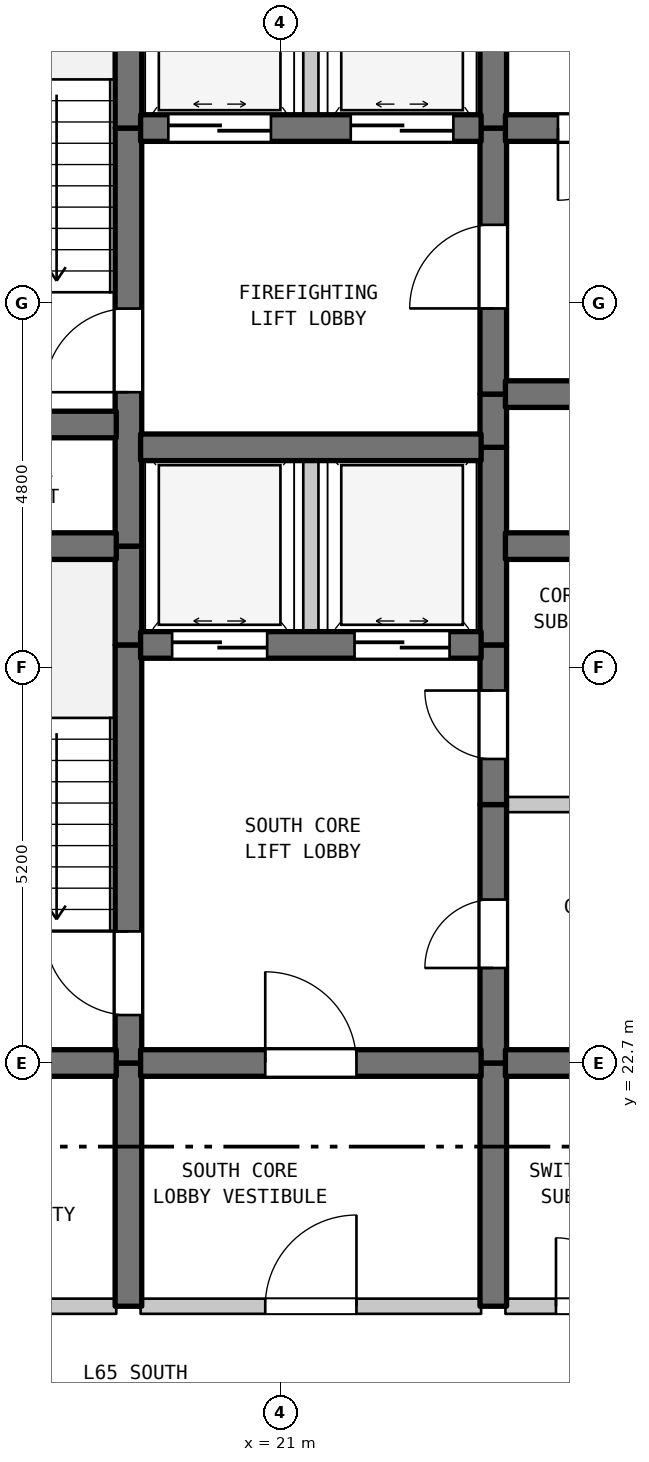
"""IFC4 building model, lengths in metres.
Left out: names, types, materials, properties, quantities, classifications, styles, units other than length and angle.
Written with IfcOpenShell. Run it as: python <this file> out.ifc"""

import sys

from ifc_helpers import new_model, si_unit, direction, frame, frame_2d, origin, place, context, subcontext, project, spatial, rectangle, extrude, element, fill, save


model = new_model("IFC4")
c1 = context("Model", 3, precision=1e-05, world=origin(), true_north=direction((0.0, 1.0)))
c2 = subcontext(c1, "Body", "Model", "MODEL_VIEW")
j1 = project(units=[si_unit("LENGTHUNIT", "METRE"), si_unit("PLANEANGLEUNIT", "RADIAN")], contexts=[c1])
p1 = place(None, origin())
s1 = spatial("IfcSite", under=j1, at=p1, CompositionType="ELEMENT")
p2 = place(p1, origin())
s2 = spatial("IfcBuilding", under=s1, at=p2, CompositionType="ELEMENT")
p3 = place(p2, frame((0.0, 0.0, 262.1)))
s3 = spatial("IfcBuildingStorey", under=s2, at=p3, CompositionType="ELEMENT", Elevation=262.1)
p4 = place(p3, frame((19.0, 19.5, 0.0), z_axis=(0.0, 0.0, 1.0), x_axis=(0.0, 1.0, 0.0)))
e1 = element("IfcWall", 1, at=p4, inside=s3, PredefinedType="SHEAR", context=c2, shape_type="SweptSolid", body=[
    extrude(rectangle(XDim=3.2, YDim=0.35, at=frame_2d((1.6, 0.0))), origin(), (0.0, 0.0, 1.0), 3.39),
])
p5 = place(p3, frame((19.0, 22.7, 0.0), z_axis=(0.0, 0.0, 1.0), x_axis=(0.0, 1.0, 0.0)))
e2 = element("IfcWall", 2, at=p5, inside=s3, PredefinedType="SHEAR", context=c2, shape_type="SweptSolid", body=[
    extrude(rectangle(XDim=5.5, YDim=0.35, at=frame_2d((2.75, 0.0))), origin(), (0.0, 0.0, 1.0), 3.39),
])
p6 = place(p5, frame((0.631, 0.0, 0.0)))
e3 = element("IfcOpeningElement", 3, at=p6, cuts=e2, PredefinedType="OPENING", context=c2, shape_type="SweptSolid", body=[
    extrude(rectangle(XDim=1.1, YDim=2.15, at=frame_2d((0.55, 1.075))), frame((0.0, 0.185, 0.0), z_axis=(0.0, -1.0, 0.0), x_axis=(1.0, 0.0, 0.0)), (0.0, 0.0, 1.0), 0.37),
])
p7 = place(p3, frame((19.0, 28.2, 0.0), z_axis=(0.0, 0.0, 1.0), x_axis=(0.0, 1.0, 0.0)))
e4 = element("IfcWall", 4, at=p7, inside=s3, PredefinedType="SHEAR", context=c2, shape_type="SweptSolid", body=[
    extrude(rectangle(XDim=1.3, YDim=0.35, at=frame_2d((0.65, 0.0))), origin(), (0.0, 0.0, 1.0), 3.39),
])
p8 = place(p3, frame((19.0, 29.5, 0.0), z_axis=(0.0, 0.0, 1.0), x_axis=(0.0, 1.0, 0.0)))
e5 = element("IfcWall", 5, at=p8, inside=s3, PredefinedType="SHEAR", context=c2, shape_type="SweptSolid", body=[
    extrude(rectangle(XDim=5.5, YDim=0.35, at=frame_2d((2.75, 0.0))), origin(), (0.0, 0.0, 1.0), 3.39),
])
p9 = place(p8, frame((2.025, 0.0, 0.0)))
e6 = element("IfcOpeningElement", 6, at=p9, cuts=e5, PredefinedType="OPENING", context=c2, shape_type="SweptSolid", body=[
    extrude(rectangle(XDim=1.1, YDim=2.15, at=frame_2d((0.55, 1.075))), frame((0.0, 0.185, 0.0), z_axis=(0.0, -1.0, 0.0), x_axis=(1.0, 0.0, 0.0)), (0.0, 0.0, 1.0), 0.37),
])
p10 = place(p3, frame((19.0, 35.0, 0.0), z_axis=(0.0, 0.0, 1.0), x_axis=(0.0, 1.0, 0.0)))
e7 = element("IfcWall", 7, at=p10, inside=s3, PredefinedType="SHEAR", context=c2, shape_type="SweptSolid", body=[
    extrude(rectangle(XDim=2.9, YDim=0.35, at=frame_2d((1.45, 0.0))), origin(), (0.0, 0.0, 1.0), 3.39),
])
p11 = place(p3, frame((21.4, 28.2, 0.0), z_axis=(0.0, 0.0, 1.0), x_axis=(0.0, 1.0, 0.0)))
e8 = element("IfcWall", 8, at=p11, inside=s3, PredefinedType="STANDARD", context=c2, shape_type="SweptSolid", body=[
    extrude(rectangle(XDim=2.6, YDim=0.2, at=frame_2d((1.3, 0.0))), origin(), (0.0, 0.0, 1.0), 3.39),
])
p12 = place(p3, frame((21.4, 35.0, 0.0), z_axis=(0.0, 0.0, 1.0), x_axis=(0.0, 1.0, 0.0)))
e9 = element("IfcWall", 9, at=p12, inside=s3, PredefinedType="STANDARD", context=c2, shape_type="SweptSolid", body=[
    extrude(rectangle(XDim=2.9, YDim=0.2, at=frame_2d((1.45, 0.0))), origin(), (0.0, 0.0, 1.0), 3.39),
])
p13 = place(p3, frame((23.8, 19.5, 0.0), z_axis=(0.0, 0.0, 1.0), x_axis=(0.0, 1.0, 0.0)))
e10 = element("IfcWall", 10, at=p13, inside=s3, PredefinedType="SHEAR", context=c2, shape_type="SweptSolid", body=[
    extrude(rectangle(XDim=3.2, YDim=0.35, at=frame_2d((1.6, 0.0))), origin(), (0.0, 0.0, 1.0), 3.39),
])
p14 = place(p3, frame((23.8, 22.7, 0.0), z_axis=(0.0, 0.0, 1.0), x_axis=(0.0, 1.0, 0.0)))
e11 = element("IfcWall", 11, at=p14, inside=s3, PredefinedType="SHEAR", context=c2, shape_type="SweptSolid", body=[
    extrude(rectangle(XDim=3.4, YDim=0.35, at=frame_2d((1.7, 0.0))), origin(), (0.0, 0.0, 1.0), 3.39),
])
p15 = place(p14, frame((1.25, 0.0, 0.0)))
e12 = element("IfcOpeningElement", 12, at=p15, cuts=e11, PredefinedType="OPENING", context=c2, shape_type="SweptSolid", body=[
    extrude(rectangle(XDim=0.9, YDim=2.15, at=frame_2d((0.45, 1.075))), frame((0.0, 0.185, 0.0), z_axis=(0.0, -1.0, 0.0), x_axis=(1.0, 0.0, 0.0)), (0.0, 0.0, 1.0), 0.37),
])
p16 = place(p3, frame((23.8, 26.1, 0.0), z_axis=(0.0, 0.0, 1.0), x_axis=(0.0, 1.0, 0.0)))
e13 = element("IfcWall", 13, at=p16, inside=s3, PredefinedType="SHEAR", context=c2, shape_type="SweptSolid", body=[
    extrude(rectangle(XDim=2.1, YDim=0.35, at=frame_2d((1.05, 0.0))), origin(), (0.0, 0.0, 1.0), 3.39),
])
p17 = place(p16, frame((0.6, 0.0, 0.0)))
e14 = element("IfcOpeningElement", 14, at=p17, cuts=e13, PredefinedType="OPENING", context=c2, shape_type="SweptSolid", body=[
    extrude(rectangle(XDim=0.9, YDim=2.15, at=frame_2d((0.45, 1.075))), frame((0.0, 0.185, 0.0), z_axis=(0.0, -1.0, 0.0), x_axis=(1.0, 0.0, 0.0)), (0.0, 0.0, 1.0), 0.37),
])
p18 = place(p3, frame((23.8, 28.2, 0.0), z_axis=(0.0, 0.0, 1.0), x_axis=(0.0, 1.0, 0.0)))
e15 = element("IfcWall", 15, at=p18, inside=s3, PredefinedType="SHEAR", context=c2, shape_type="SweptSolid", body=[
    extrude(rectangle(XDim=2.6, YDim=0.35, at=frame_2d((1.3, 0.0))), origin(), (0.0, 0.0, 1.0), 3.39),
])
p19 = place(p3, frame((23.8, 30.8, 0.0), z_axis=(0.0, 0.0, 1.0), x_axis=(0.0, 1.0, 0.0)))
e16 = element("IfcWall", 16, at=p19, inside=s3, PredefinedType="SHEAR", context=c2, shape_type="SweptSolid", body=[
    extrude(rectangle(XDim=0.7, YDim=0.35, at=frame_2d((0.35, 0.0))), origin(), (0.0, 0.0, 1.0), 3.39),
])
p20 = place(p3, frame((23.8, 31.5, 0.0), z_axis=(0.0, 0.0, 1.0), x_axis=(0.0, 1.0, 0.0)))
e17 = element("IfcWall", 17, at=p20, inside=s3, PredefinedType="SHEAR", context=c2, shape_type="SweptSolid", body=[
    extrude(rectangle(XDim=3.5, YDim=0.35, at=frame_2d((1.75, 0.0))), origin(), (0.0, 0.0, 1.0), 3.39),
])
p21 = place(p20, frame((1.127, 0.0, 0.0)))
e18 = element("IfcOpeningElement", 18, at=p21, cuts=e17, PredefinedType="OPENING", context=c2, shape_type="SweptSolid", body=[
    extrude(rectangle(XDim=1.1, YDim=2.15, at=frame_2d((0.55, 1.075))), frame((0.0, 0.185, 0.0), z_axis=(0.0, -1.0, 0.0), x_axis=(1.0, 0.0, 0.0)), (0.0, 0.0, 1.0), 0.37),
])
p22 = place(p3, frame((23.8, 35.0, 0.0), z_axis=(0.0, 0.0, 1.0), x_axis=(0.0, 1.0, 0.0)))
e19 = element("IfcWall", 19, at=p22, inside=s3, PredefinedType="SHEAR", context=c2, shape_type="SweptSolid", body=[
    extrude(rectangle(XDim=2.9, YDim=0.35, at=frame_2d((1.45, 0.0))), origin(), (0.0, 0.0, 1.0), 3.39),
])
p23 = place(p3, frame((15.16, 19.5, 0.0), z_axis=(0.0, 0.0, 1.0), x_axis=(1.0, 0.0, 0.0)))
e20 = element("IfcWall", 20, at=p23, inside=s3, PredefinedType="STANDARD", context=c2, shape_type="SweptSolid", body=[
    extrude(rectangle(XDim=3.68, YDim=0.2, at=frame_2d((1.84, 0.0))), origin(), (0.0, 0.0, 1.0), 3.39),
])
p24 = place(p23, frame((1.39, 0.0, 0.0)))
e21 = element("IfcOpeningElement", 21, at=p24, cuts=e20, PredefinedType="OPENING", context=c2, shape_type="SweptSolid", body=[
    extrude(rectangle(XDim=0.9, YDim=2.15, at=frame_2d((0.45, 1.075))), frame((0.0, 0.11, 0.0), z_axis=(0.0, -1.0, 0.0), x_axis=(1.0, 0.0, 0.0)), (0.0, 0.0, 1.0), 0.22),
])
p25 = place(p3, frame((19.16, 19.5, 0.0), z_axis=(0.0, 0.0, 1.0), x_axis=(1.0, 0.0, 0.0)))
e22 = element("IfcWall", 22, at=p25, inside=s3, PredefinedType="STANDARD", context=c2, shape_type="SweptSolid", body=[
    extrude(rectangle(XDim=4.48, YDim=0.2, at=frame_2d((2.24, 0.0))), origin(), (0.0, 0.0, 1.0), 3.39),
])
p26 = place(p25, frame((1.64, 0.0, 0.0)))
e23 = element("IfcOpeningElement", 23, at=p26, cuts=e22, PredefinedType="OPENING", context=c2, shape_type="SweptSolid", body=[
    extrude(rectangle(XDim=1.2, YDim=2.2, at=frame_2d((0.6, 1.1))), frame((0.0, 0.11, 0.0), z_axis=(0.0, -1.0, 0.0), x_axis=(1.0, 0.0, 0.0)), (0.0, 0.0, 1.0), 0.22),
])
p27 = place(p3, frame((23.96, 19.5, 0.0), z_axis=(0.0, 0.0, 1.0), x_axis=(1.0, 0.0, 0.0)))
e24 = element("IfcWall", 24, at=p27, inside=s3, PredefinedType="STANDARD", context=c2, shape_type="SweptSolid", body=[
    extrude(rectangle(XDim=4.455, YDim=0.2, at=frame_2d((2.228, 0.0))), origin(), (0.0, 0.0, 1.0), 3.39),
])
p28 = place(p27, frame((0.665, 0.0, 0.0)))
e25 = element("IfcOpeningElement", 25, at=p28, cuts=e24, PredefinedType="OPENING", context=c2, shape_type="SweptSolid", body=[
    extrude(rectangle(XDim=0.9, YDim=2.15, at=frame_2d((0.45, 1.075))), frame((0.0, 0.11, 0.0), z_axis=(0.0, -1.0, 0.0), x_axis=(1.0, 0.0, 0.0)), (0.0, 0.0, 1.0), 0.22),
])
p29 = place(p27, frame((2.791, 0.0, 0.0)))
e26 = element("IfcOpeningElement", 26, at=p29, cuts=e24, PredefinedType="OPENING", context=c2, shape_type="SweptSolid", body=[
    extrude(rectangle(XDim=0.9, YDim=2.15, at=frame_2d((0.45, 1.075))), frame((0.0, 0.11, 0.0), z_axis=(0.0, -1.0, 0.0), x_axis=(1.0, 0.0, 0.0)), (0.0, 0.0, 1.0), 0.22),
])
p30 = place(p3, frame((15.16, 22.7, 0.0), z_axis=(0.0, 0.0, 1.0), x_axis=(1.0, 0.0, 0.0)))
e27 = element("IfcWall", 27, at=p30, inside=s3, PredefinedType="SHEAR", context=c2, shape_type="SweptSolid", body=[
    extrude(rectangle(XDim=3.68, YDim=0.35, at=frame_2d((1.84, 0.0))), origin(), (0.0, 0.0, 1.0), 3.39),
])
p31 = place(p3, frame((19.16, 22.7, 0.0), z_axis=(0.0, 0.0, 1.0), x_axis=(1.0, 0.0, 0.0)))
e28 = element("IfcWall", 28, at=p31, inside=s3, PredefinedType="SHEAR", context=c2, shape_type="SweptSolid", body=[
    extrude(rectangle(XDim=4.48, YDim=0.35, at=frame_2d((2.24, 0.0))), origin(), (0.0, 0.0, 1.0), 3.39),
])
p32 = place(p31, frame((1.64, 0.0, 0.0)))
e29 = element("IfcOpeningElement", 29, at=p32, cuts=e28, PredefinedType="OPENING", context=c2, shape_type="SweptSolid", body=[
    extrude(rectangle(XDim=1.2, YDim=2.2, at=frame_2d((0.6, 1.1))), frame((0.0, 0.185, 0.0), z_axis=(0.0, -1.0, 0.0), x_axis=(1.0, 0.0, 0.0)), (0.0, 0.0, 1.0), 0.37),
])
p33 = place(p3, frame((23.96, 22.7, 0.0), z_axis=(0.0, 0.0, 1.0), x_axis=(1.0, 0.0, 0.0)))
e30 = element("IfcWall", 30, at=p33, inside=s3, PredefinedType="SHEAR", context=c2, shape_type="SweptSolid", body=[
    extrude(rectangle(XDim=3.18, YDim=0.35, at=frame_2d((1.59, 0.0))), origin(), (0.0, 0.0, 1.0), 3.39),
])
p34 = place(p3, frame((23.96, 26.1, 0.0), z_axis=(0.0, 0.0, 1.0), x_axis=(1.0, 0.0, 0.0)))
e31 = element("IfcWall", 31, at=p34, inside=s3, PredefinedType="STANDARD", context=c2, shape_type="SweptSolid", body=[
    extrude(rectangle(XDim=3.18, YDim=0.2, at=frame_2d((1.59, 0.0))), origin(), (0.0, 0.0, 1.0), 3.39),
])
p35 = place(p3, frame((19.16, 28.2, 0.0), z_axis=(0.0, 0.0, 1.0), x_axis=(1.0, 0.0, 0.0)))
e32 = element("IfcWall", 32, at=p35, inside=s3, PredefinedType="SHEAR", context=c2, shape_type="SweptSolid", body=[
    extrude(rectangle(XDim=4.48, YDim=0.35, at=frame_2d((2.24, 0.0))), origin(), (0.0, 0.0, 1.0), 3.39),
])
p36 = place(p35, frame((0.415, 0.0, 0.0)))
e33 = element("IfcOpeningElement", 33, at=p36, cuts=e32, PredefinedType="OPENING", context=c2, shape_type="SweptSolid", body=[
    extrude(rectangle(XDim=1.25, YDim=2.2, at=frame_2d((0.625, 1.1))), frame((0.0, 0.185, 0.0), z_axis=(0.0, -1.0, 0.0), x_axis=(1.0, 0.0, 0.0)), (0.0, 0.0, 1.0), 0.37),
])
p37 = place(p35, frame((2.815, 0.0, 0.0)))
e34 = element("IfcOpeningElement", 34, at=p37, cuts=e32, PredefinedType="OPENING", context=c2, shape_type="SweptSolid", body=[
    extrude(rectangle(XDim=1.25, YDim=2.2, at=frame_2d((0.625, 1.1))), frame((0.0, 0.185, 0.0), z_axis=(0.0, -1.0, 0.0), x_axis=(1.0, 0.0, 0.0)), (0.0, 0.0, 1.0), 0.37),
])
p38 = place(p3, frame((15.16, 29.5, 0.0), z_axis=(0.0, 0.0, 1.0), x_axis=(1.0, 0.0, 0.0)))
e35 = element("IfcWall", 35, at=p38, inside=s3, PredefinedType="SHEAR", context=c2, shape_type="SweptSolid", body=[
    extrude(rectangle(XDim=3.68, YDim=0.35, at=frame_2d((1.84, 0.0))), origin(), (0.0, 0.0, 1.0), 3.39),
])
p39 = place(p3, frame((23.96, 29.5, 0.0), z_axis=(0.0, 0.0, 1.0), x_axis=(1.0, 0.0, 0.0)))
e36 = element("IfcWall", 36, at=p39, inside=s3, PredefinedType="SHEAR", context=c2, shape_type="SweptSolid", body=[
    extrude(rectangle(XDim=3.18, YDim=0.35, at=frame_2d((1.59, 0.0))), origin(), (0.0, 0.0, 1.0), 3.39),
])
p40 = place(p3, frame((19.16, 30.8, 0.0), z_axis=(0.0, 0.0, 1.0), x_axis=(1.0, 0.0, 0.0)))
e37 = element("IfcWall", 37, at=p40, inside=s3, PredefinedType="SHEAR", context=c2, shape_type="SweptSolid", body=[
    extrude(rectangle(XDim=4.48, YDim=0.35, at=frame_2d((2.24, 0.0))), origin(), (0.0, 0.0, 1.0), 3.39),
])
p41 = place(p3, frame((15.16, 31.1, 0.0), z_axis=(0.0, 0.0, 1.0), x_axis=(1.0, 0.0, 0.0)))
e38 = element("IfcWall", 38, at=p41, inside=s3, PredefinedType="SHEAR", context=c2, shape_type="SweptSolid", body=[
    extrude(rectangle(XDim=3.68, YDim=0.35, at=frame_2d((1.84, 0.0))), origin(), (0.0, 0.0, 1.0), 3.39),
])
p42 = place(p3, frame((23.96, 31.5, 0.0), z_axis=(0.0, 0.0, 1.0), x_axis=(1.0, 0.0, 0.0)))
e39 = element("IfcWall", 39, at=p42, inside=s3, PredefinedType="SHEAR", context=c2, shape_type="SweptSolid", body=[
    extrude(rectangle(XDim=3.18, YDim=0.35, at=frame_2d((1.59, 0.0))), origin(), (0.0, 0.0, 1.0), 3.39),
])
p43 = place(p42, frame((1.094, 0.0, 0.0)))
e40 = element("IfcOpeningElement", 40, at=p43, cuts=e39, PredefinedType="OPENING", context=c2, shape_type="SweptSolid", body=[
    extrude(rectangle(XDim=0.85, YDim=2.1, at=frame_2d((0.425, 1.05))), frame((0.0, 0.185, 0.0), z_axis=(0.0, -1.0, 0.0), x_axis=(1.0, 0.0, 0.0)), (0.0, 0.0, 1.0), 0.37),
])
p44 = place(p3, frame((19.16, 35.0, 0.0), z_axis=(0.0, 0.0, 1.0), x_axis=(1.0, 0.0, 0.0)))
e41 = element("IfcWall", 41, at=p44, inside=s3, PredefinedType="SHEAR", context=c2, shape_type="SweptSolid", body=[
    extrude(rectangle(XDim=4.48, YDim=0.35, at=frame_2d((2.24, 0.0))), origin(), (0.0, 0.0, 1.0), 3.39),
])
p45 = place(p44, frame((0.365, 0.0, 0.0)))
e42 = element("IfcOpeningElement", 42, at=p45, cuts=e41, PredefinedType="OPENING", context=c2, shape_type="SweptSolid", body=[
    extrude(rectangle(XDim=1.35, YDim=2.2, at=frame_2d((0.675, 1.1))), frame((0.0, 0.185, 0.0), z_axis=(0.0, -1.0, 0.0), x_axis=(1.0, 0.0, 0.0)), (0.0, 0.0, 1.0), 0.37),
])
p46 = place(p44, frame((2.765, 0.0, 0.0)))
e43 = element("IfcOpeningElement", 43, at=p46, cuts=e41, PredefinedType="OPENING", context=c2, shape_type="SweptSolid", body=[
    extrude(rectangle(XDim=1.35, YDim=2.2, at=frame_2d((0.675, 1.1))), frame((0.0, 0.185, 0.0), z_axis=(0.0, -1.0, 0.0), x_axis=(1.0, 0.0, 0.0)), (0.0, 0.0, 1.0), 0.37),
])
p47 = place(p3, frame((23.96, 35.0, 0.0), z_axis=(0.0, 0.0, 1.0), x_axis=(1.0, 0.0, 0.0)))
e44 = element("IfcWall", 44, at=p47, inside=s3, PredefinedType="SHEAR", context=c2, shape_type="SweptSolid", body=[
    extrude(rectangle(XDim=2.595, YDim=0.35, at=frame_2d((1.297, 0.0))), origin(), (0.0, 0.0, 1.0), 3.39),
])
p48 = place(p47, frame((0.691, 0.0, 0.0)))
e45 = element("IfcOpeningElement", 45, at=p48, cuts=e44, PredefinedType="OPENING", context=c2, shape_type="SweptSolid", body=[
    extrude(rectangle(XDim=0.95, YDim=2.15, at=frame_2d((0.475, 1.075))), frame((0.0, 0.185, 0.0), z_axis=(0.0, -1.0, 0.0), x_axis=(1.0, 0.0, 0.0)), (0.0, 0.0, 1.0), 0.37),
])
p49 = place(p6, origin())
e46 = element("IfcDoor", 46, at=p49, inside=s3, OperationType="SINGLE_SWING_RIGHT", PredefinedType="DOOR", context=c2, shape_type="SweptSolid", body=[
    extrude(rectangle(XDim=1.1, YDim=2.15, at=frame_2d((0.55, 1.075))), frame((0.0, 0.025, 0.0), z_axis=(0.0, -1.0, 0.0), x_axis=(1.0, 0.0, 0.0)), (0.0, 0.0, 1.0), 0.05),
])
fill(e3, e46)
p50 = place(p9, origin())
e47 = element("IfcDoor", 47, at=p50, inside=s3, OperationType="SINGLE_SWING_LEFT", PredefinedType="DOOR", context=c2, shape_type="SweptSolid", body=[
    extrude(rectangle(XDim=1.1, YDim=2.15, at=frame_2d((0.55, 1.075))), frame((0.0, 0.025, 0.0), z_axis=(0.0, -1.0, 0.0), x_axis=(1.0, 0.0, 0.0)), (0.0, 0.0, 1.0), 0.05),
])
fill(e6, e47)
p51 = place(p15, origin())
e48 = element("IfcDoor", 48, at=p51, inside=s3, OperationType="SINGLE_SWING_LEFT", PredefinedType="DOOR", context=c2, shape_type="SweptSolid", body=[
    extrude(rectangle(XDim=0.9, YDim=2.15, at=frame_2d((0.45, 1.075))), frame((0.0, 0.025, 0.0), z_axis=(0.0, -1.0, 0.0), x_axis=(1.0, 0.0, 0.0)), (0.0, 0.0, 1.0), 0.05),
])
fill(e12, e48)
p52 = place(p17, origin())
e49 = element("IfcDoor", 49, at=p52, inside=s3, OperationType="SINGLE_SWING_RIGHT", PredefinedType="DOOR", context=c2, shape_type="SweptSolid", body=[
    extrude(rectangle(XDim=0.9, YDim=2.15, at=frame_2d((0.45, 1.075))), frame((0.0, 0.025, 0.0), z_axis=(0.0, -1.0, 0.0), x_axis=(1.0, 0.0, 0.0)), (0.0, 0.0, 1.0), 0.05),
])
fill(e14, e49)
p53 = place(p21, origin())
e50 = element("IfcDoor", 50, at=p53, inside=s3, OperationType="SINGLE_SWING_LEFT", PredefinedType="DOOR", context=c2, shape_type="SweptSolid", body=[
    extrude(rectangle(XDim=1.1, YDim=2.15, at=frame_2d((0.55, 1.075))), frame((0.0, 0.025, 0.0), z_axis=(0.0, -1.0, 0.0), x_axis=(1.0, 0.0, 0.0)), (0.0, 0.0, 1.0), 0.05),
])
fill(e18, e50)
p54 = place(p26, origin())
e51 = element("IfcDoor", 51, at=p54, inside=s3, OperationType="SINGLE_SWING_RIGHT", PredefinedType="DOOR", context=c2, shape_type="SweptSolid", body=[
    extrude(rectangle(XDim=1.2, YDim=2.2, at=frame_2d((0.6, 1.1))), frame((0.0, 0.025, 0.0), z_axis=(0.0, -1.0, 0.0), x_axis=(1.0, 0.0, 0.0)), (0.0, 0.0, 1.0), 0.05),
])
fill(e23, e51)
p55 = place(p28, origin())
e52 = element("IfcDoor", 52, at=p55, inside=s3, OperationType="SINGLE_SWING_LEFT", PredefinedType="DOOR", context=c2, shape_type="SweptSolid", body=[
    extrude(rectangle(XDim=0.9, YDim=2.15, at=frame_2d((0.45, 1.075))), frame((0.0, 0.025, 0.0), z_axis=(0.0, -1.0, 0.0), x_axis=(1.0, 0.0, 0.0)), (0.0, 0.0, 1.0), 0.05),
])
fill(e25, e52)
p56 = place(p32, origin())
e53 = element("IfcDoor", 53, at=p56, inside=s3, OperationType="SINGLE_SWING_LEFT", PredefinedType="DOOR", context=c2, shape_type="SweptSolid", body=[
    extrude(rectangle(XDim=1.2, YDim=2.2, at=frame_2d((0.6, 1.1))), frame((0.0, 0.025, 0.0), z_axis=(0.0, -1.0, 0.0), x_axis=(1.0, 0.0, 0.0)), (0.0, 0.0, 1.0), 0.05),
])
fill(e29, e53)
p57 = place(p36, origin())
e54 = element("IfcDoor", 54, at=p57, inside=s3, OperationType="DOUBLE_DOOR_SLIDING", PredefinedType="DOOR", context=c2, shape_type="SweptSolid", body=[
    extrude(rectangle(XDim=1.25, YDim=2.2, at=frame_2d((0.625, 1.1))), frame((0.0, 0.025, 0.0), z_axis=(0.0, -1.0, 0.0), x_axis=(1.0, 0.0, 0.0)), (0.0, 0.0, 1.0), 0.05),
])
fill(e33, e54)
p58 = place(p37, origin())
e55 = element("IfcDoor", 55, at=p58, inside=s3, OperationType="DOUBLE_DOOR_SLIDING", PredefinedType="DOOR", context=c2, shape_type="SweptSolid", body=[
    extrude(rectangle(XDim=1.25, YDim=2.2, at=frame_2d((0.625, 1.1))), frame((0.0, 0.025, 0.0), z_axis=(0.0, -1.0, 0.0), x_axis=(1.0, 0.0, 0.0)), (0.0, 0.0, 1.0), 0.05),
])
fill(e34, e55)
p59 = place(p45, origin())
e56 = element("IfcDoor", 56, at=p59, inside=s3, OperationType="DOUBLE_DOOR_SLIDING", PredefinedType="DOOR", context=c2, shape_type="SweptSolid", body=[
    extrude(rectangle(XDim=1.35, YDim=2.2, at=frame_2d((0.675, 1.1))), frame((0.0, 0.025, 0.0), z_axis=(0.0, -1.0, 0.0), x_axis=(1.0, 0.0, 0.0)), (0.0, 0.0, 1.0), 0.05),
])
fill(e42, e56)
p60 = place(p46, origin())
e57 = element("IfcDoor", 57, at=p60, inside=s3, OperationType="DOUBLE_DOOR_SLIDING", PredefinedType="DOOR", context=c2, shape_type="SweptSolid", body=[
    extrude(rectangle(XDim=1.35, YDim=2.2, at=frame_2d((0.675, 1.1))), frame((0.0, 0.025, 0.0), z_axis=(0.0, -1.0, 0.0), x_axis=(1.0, 0.0, 0.0)), (0.0, 0.0, 1.0), 0.05),
])
fill(e43, e57)
p61 = place(p48, frame((0.95, 0.0, 0.0), z_axis=(0.0, 0.0, 1.0), x_axis=(-1.0, 0.0, 0.0)))
e58 = element("IfcDoor", 58, at=p61, inside=s3, OperationType="SINGLE_SWING_LEFT", PredefinedType="DOOR", context=c2, shape_type="SweptSolid", body=[
    extrude(rectangle(XDim=0.95, YDim=2.15, at=frame_2d((0.475, 1.075))), frame((0.0, 0.025, 0.0), z_axis=(0.0, -1.0, 0.0), x_axis=(1.0, 0.0, 0.0)), (0.0, 0.0, 1.0), 0.05),
])
fill(e45, e58)
save(model, sys.argv[1])
